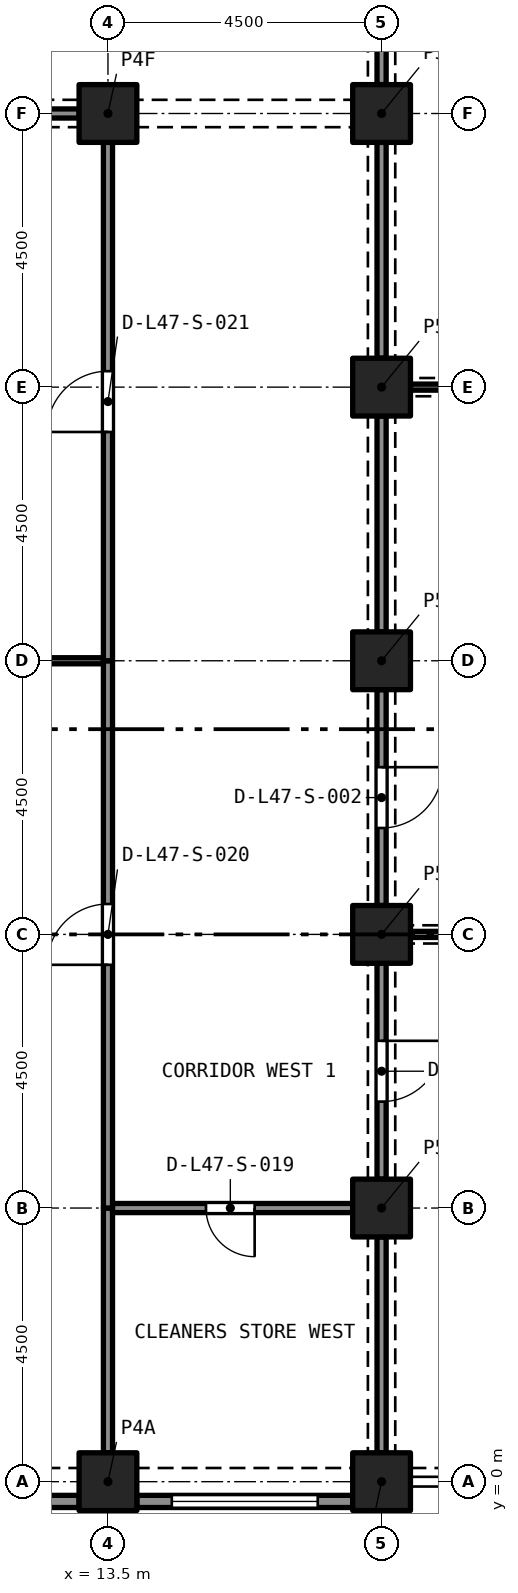
"""IFC4 building model, lengths in metres.
Left out: names, types, materials, properties, quantities, classifications, styles, units other than length and angle.
Written with IfcOpenShell. Run it as: python <this file> out.ifc"""

import sys

from ifc_helpers import new_model, si_unit, direction, frame, frame_2d, origin, origin_2d, place, context, subcontext, project, spatial, rectangle, extrude, element, fill, save


model = new_model("IFC4")
c1 = context("Model", 3, precision=1e-05, world=origin(), true_north=direction((0.0, 1.0)))
c2 = subcontext(c1, "Body", "Model", "MODEL_VIEW")
j1 = project(units=[si_unit("LENGTHUNIT", "METRE"), si_unit("PLANEANGLEUNIT", "RADIAN")], contexts=[c1])
p1 = place(None, origin())
s1 = spatial("IfcSite", under=j1, at=p1, CompositionType="ELEMENT")
p2 = place(p1, origin())
s2 = spatial("IfcBuilding", under=s1, at=p2, CompositionType="ELEMENT")
p3 = place(p2, frame((0.0, 0.0, 172.6)))
s3 = spatial("IfcBuildingStorey", under=s2, at=p3, CompositionType="ELEMENT", Elevation=172.6)
for number, where, z_axis, x_axis in (
    (1, (13.5, 0.0, 0.0), (0.0, 0.0, 1.0), (1.0, 0.0, 0.0)),
    (2, (18.0, 0.0, 0.0), (0.0, 0.0, 1.0), (1.0, 0.0, 0.0)),
    (3, (18.0, 4.5, 0.0), (0.0, 0.0, 1.0), (1.0, 0.0, 0.0)),
    (4, (18.0, 9.0, 0.0), (0.0, 0.0, 1.0), (1.0, 0.0, 0.0)),
    (5, (18.0, 13.5, 0.0), (0.0, 0.0, 1.0), (1.0, 0.0, 0.0)),
    (6, (18.0, 18.0, 0.0), (0.0, 0.0, 1.0), (1.0, 0.0, 0.0)),
    (7, (13.5, 22.5, 0.0), (0.0, 0.0, 1.0), (1.0, 0.0, 0.0)),
    (8, (18.0, 22.5, 0.0), (0.0, 0.0, 1.0), (1.0, 0.0, 0.0)),
):
    element("IfcColumn", number, at=place(p3, frame(where, z_axis=z_axis, x_axis=x_axis)), inside=s3, PredefinedType="COLUMN", context=c2, shape_type="SweptSolid", body=[
        extrude(rectangle(XDim=0.95, YDim=0.95, at=origin_2d()), origin(), (0.0, 0.0, 1.0), 3.7),
    ])
p4 = place(p3, frame((13.025, -0.325, 0.0), z_axis=(0.0, 0.0, 1.0), x_axis=(-1.0, 0.0, 0.0)))
e9 = element("IfcWall", 9, at=p4, inside=s3, PredefinedType="SOLIDWALL", context=c2, shape_type="SweptSolid", body=[
    extrude(rectangle(XDim=3.55, YDim=0.2, at=frame_2d((1.775, 0.0))), origin(), (0.0, 0.0, 1.0), 3.7),
])
p5 = place(p4, frame((0.575, 0.0, 0.45)))
e10 = element("IfcOpeningElement", 10, at=p5, cuts=e9, PredefinedType="OPENING", context=c2, shape_type="SweptSolid", body=[
    extrude(rectangle(XDim=2.4, YDim=1.95, at=frame_2d((1.2, 0.975))), frame((0.0, 0.11, 0.0), z_axis=(0.0, -1.0, 0.0), x_axis=(1.0, 0.0, 0.0)), (0.0, 0.0, 1.0), 0.22),
])
p6 = place(p3, frame((17.525, -0.325, 0.0), z_axis=(0.0, 0.0, 1.0), x_axis=(-1.0, 0.0, 0.0)))
e11 = element("IfcWall", 11, at=p6, inside=s3, PredefinedType="SOLIDWALL", context=c2, shape_type="SweptSolid", body=[
    extrude(rectangle(XDim=3.55, YDim=0.2, at=frame_2d((1.775, 0.0))), origin(), (0.0, 0.0, 1.0), 3.7),
])
p7 = place(p6, frame((0.575, 0.0, 0.45)))
e12 = element("IfcOpeningElement", 12, at=p7, cuts=e11, PredefinedType="OPENING", context=c2, shape_type="SweptSolid", body=[
    extrude(rectangle(XDim=2.4, YDim=1.95, at=frame_2d((1.2, 0.975))), frame((0.0, 0.11, 0.0), z_axis=(0.0, -1.0, 0.0), x_axis=(1.0, 0.0, 0.0)), (0.0, 0.0, 1.0), 0.22),
])
p8 = place(p3, frame((18.475, 9.0, 0.0), z_axis=(0.0, 0.0, 1.0), x_axis=(1.0, 0.0, 0.0)))
e13 = element("IfcWall", 13, at=p8, inside=s3, PredefinedType="PARTITIONING", context=c2, shape_type="SweptSolid", body=[
    extrude(rectangle(XDim=12.55, YDim=0.1, at=frame_2d((6.275, 0.0))), origin(), (0.0, 0.0, 1.0), 3.25),
])
p9 = place(p3, frame((18.0, 0.475, 0.0), z_axis=(0.0, 0.0, 1.0), x_axis=(0.0, 1.0, 0.0)))
e14 = element("IfcWall", 14, at=p9, inside=s3, PredefinedType="PARTITIONING", context=c2, shape_type="SweptSolid", body=[
    extrude(rectangle(XDim=3.55, YDim=0.15, at=frame_2d((1.775, 0.0))), origin(), (0.0, 0.0, 1.0), 2.88),
])
p10 = place(p3, frame((18.0, 8.525, 0.0), z_axis=(0.0, 0.0, 1.0), x_axis=(0.0, -1.0, 0.0)))
e15 = element("IfcWall", 15, at=p10, inside=s3, PredefinedType="PARTITIONING", context=c2, shape_type="SweptSolid", body=[
    extrude(rectangle(XDim=3.55, YDim=0.15, at=frame_2d((1.775, 0.0))), origin(), (0.0, 0.0, 1.0), 2.88),
])
p11 = place(p10, frame((1.275, 0.0, 0.0)))
e16 = element("IfcOpeningElement", 16, at=p11, cuts=e15, PredefinedType="OPENING", context=c2, shape_type="SweptSolid", body=[
    extrude(rectangle(XDim=1.0, YDim=2.1, at=frame_2d((0.5, 1.05))), frame((0.0, 0.085, 0.0), z_axis=(0.0, -1.0, 0.0), x_axis=(1.0, 0.0, 0.0)), (0.0, 0.0, 1.0), 0.17),
])
p12 = place(p3, frame((18.475, 18.0, 0.0), z_axis=(0.0, 0.0, 1.0), x_axis=(1.0, 0.0, 0.0)))
e17 = element("IfcWall", 17, at=p12, inside=s3, PredefinedType="PARTITIONING", context=c2, shape_type="SweptSolid", body=[
    extrude(rectangle(XDim=12.55, YDim=0.1, at=frame_2d((6.275, 0.0))), origin(), (0.0, 0.0, 1.0), 3.25),
])
p13 = place(p3, frame((18.0, 13.025, 0.0), z_axis=(0.0, 0.0, 1.0), x_axis=(0.0, -1.0, 0.0)))
e18 = element("IfcWall", 18, at=p13, inside=s3, PredefinedType="PARTITIONING", context=c2, shape_type="SweptSolid", body=[
    extrude(rectangle(XDim=3.55, YDim=0.15, at=frame_2d((1.775, 0.0))), origin(), (0.0, 0.0, 1.0), 2.88),
])
p14 = place(p13, frame((1.275, 0.0, 0.0)))
e19 = element("IfcOpeningElement", 19, at=p14, cuts=e18, PredefinedType="OPENING", context=c2, shape_type="SweptSolid", body=[
    extrude(rectangle(XDim=1.0, YDim=2.1, at=frame_2d((0.5, 1.05))), frame((0.0, 0.085, 0.0), z_axis=(0.0, -1.0, 0.0), x_axis=(1.0, 0.0, 0.0)), (0.0, 0.0, 1.0), 0.17),
])
p15 = place(p3, frame((18.0, 13.975, 0.0), z_axis=(0.0, 0.0, 1.0), x_axis=(0.0, 1.0, 0.0)))
e20 = element("IfcWall", 20, at=p15, inside=s3, PredefinedType="PARTITIONING", context=c2, shape_type="SweptSolid", body=[
    extrude(rectangle(XDim=3.55, YDim=0.15, at=frame_2d((1.775, 0.0))), origin(), (0.0, 0.0, 1.0), 2.88),
])
p16 = place(p3, frame((18.0, 26.525, 0.0), z_axis=(0.0, 0.0, 1.0), x_axis=(0.0, -1.0, 0.0)))
e21 = element("IfcWall", 21, at=p16, inside=s3, PredefinedType="PARTITIONING", context=c2, shape_type="SweptSolid", body=[
    extrude(rectangle(XDim=3.55, YDim=0.15, at=frame_2d((1.775, 0.0))), origin(), (0.0, 0.0, 1.0), 2.88),
])
p17 = place(p16, frame((1.275, 0.0, 0.0)))
e22 = element("IfcOpeningElement", 22, at=p17, cuts=e21, PredefinedType="OPENING", context=c2, shape_type="SweptSolid", body=[
    extrude(rectangle(XDim=1.0, YDim=2.1, at=frame_2d((0.5, 1.05))), frame((0.0, 0.085, 0.0), z_axis=(0.0, -1.0, 0.0), x_axis=(1.0, 0.0, 0.0)), (0.0, 0.0, 1.0), 0.17),
])
for number, where, z_axis, x_axis in (
    (23, (18.0, 18.475, 0.0), (0.0, 0.0, 1.0), (0.0, 1.0, 0.0)),
    (24, (9.475, 22.5, 0.0), (0.0, 0.0, 1.0), (1.0, 0.0, 0.0)),
):
    element("IfcWall", number, at=place(p3, frame(where, z_axis=z_axis, x_axis=x_axis)), inside=s3, PredefinedType="PARTITIONING", context=c2, shape_type="SweptSolid", body=[
        extrude(rectangle(XDim=3.55, YDim=0.15, at=frame_2d((1.775, 0.0))), origin(), (0.0, 0.0, 1.0), 2.88),
    ])
p18 = place(p3, frame((13.5, 0.475, 0.0), z_axis=(0.0, 0.0, 1.0), x_axis=(0.0, 1.0, 0.0)))
e25 = element("IfcWall", 25, at=p18, inside=s3, PredefinedType="PARTITIONING", context=c2, shape_type="SweptSolid", body=[
    extrude(rectangle(XDim=4.025, YDim=0.15, at=frame_2d((2.012, 0.0))), origin(), (0.0, 0.0, 1.0), 3.4),
])
p19 = place(p3, frame((17.525, 4.5, 0.0), z_axis=(0.0, 0.0, 1.0), x_axis=(-1.0, 0.0, 0.0)))
e26 = element("IfcWall", 26, at=p19, inside=s3, PredefinedType="PARTITIONING", context=c2, shape_type="SweptSolid", body=[
    extrude(rectangle(XDim=3.95, YDim=0.15, at=frame_2d((1.975, 0.0))), origin(), (0.0, 0.0, 1.0), 3.4),
])
p20 = place(p19, frame((1.613, 0.0, 0.0)))
e27 = element("IfcOpeningElement", 27, at=p20, cuts=e26, PredefinedType="OPENING", context=c2, shape_type="SweptSolid", body=[
    extrude(rectangle(XDim=0.8, YDim=2.1, at=frame_2d((0.4, 1.05))), frame((0.0, 0.085, 0.0), z_axis=(0.0, -1.0, 0.0), x_axis=(1.0, 0.0, 0.0)), (0.0, 0.0, 1.0), 0.17),
])
p21 = place(p3, frame((13.5, 4.5, 0.0), z_axis=(0.0, 0.0, 1.0), x_axis=(0.0, 1.0, 0.0)))
e28 = element("IfcWall", 28, at=p21, inside=s3, PredefinedType="PARTITIONING", context=c2, shape_type="SweptSolid", body=[
    extrude(rectangle(XDim=9.0, YDim=0.15, at=frame_2d((4.5, 0.0))), origin(), (0.0, 0.0, 1.0), 3.4),
])
p22 = place(p21, frame((4.0, 0.0, 0.0)))
e29 = element("IfcOpeningElement", 29, at=p22, cuts=e28, PredefinedType="OPENING", context=c2, shape_type="SweptSolid", body=[
    extrude(rectangle(XDim=1.0, YDim=2.1, at=frame_2d((0.5, 1.05))), frame((0.0, 0.085, 0.0), z_axis=(0.0, -1.0, 0.0), x_axis=(1.0, 0.0, 0.0)), (0.0, 0.0, 1.0), 0.17),
])
p23 = place(p3, frame((13.5, 13.5, 0.0), z_axis=(0.0, 0.0, 1.0), x_axis=(0.0, 1.0, 0.0)))
e30 = element("IfcWall", 30, at=p23, inside=s3, PredefinedType="PARTITIONING", context=c2, shape_type="SweptSolid", body=[
    extrude(rectangle(XDim=8.525, YDim=0.15, at=frame_2d((4.262, 0.0))), origin(), (0.0, 0.0, 1.0), 3.4),
])
p24 = place(p23, frame((3.762, 0.0, 0.0)))
e31 = element("IfcOpeningElement", 31, at=p24, cuts=e30, PredefinedType="OPENING", context=c2, shape_type="SweptSolid", body=[
    extrude(rectangle(XDim=1.0, YDim=2.1, at=frame_2d((0.5, 1.05))), frame((0.0, 0.085, 0.0), z_axis=(0.0, -1.0, 0.0), x_axis=(1.0, 0.0, 0.0)), (0.0, 0.0, 1.0), 0.17),
])
p25 = place(p3, frame((0.475, 13.5, 0.0), z_axis=(0.0, 0.0, 1.0), x_axis=(1.0, 0.0, 0.0)))
e32 = element("IfcWall", 32, at=p25, inside=s3, PredefinedType="PARTITIONING", context=c2, shape_type="SweptSolid", body=[
    extrude(rectangle(XDim=12.95, YDim=0.1, at=frame_2d((6.475, 0.0))), origin(), (0.0, 0.0, 1.0), 3.4),
])
p26 = place(p7, origin())
e33 = element("IfcWindow", 33, at=p26, inside=s3, PartitioningType="SINGLE_PANEL", PredefinedType="WINDOW", context=c2, shape_type="SweptSolid", body=[
    extrude(rectangle(XDim=2.4, YDim=1.95, at=frame_2d((1.2, 0.975))), frame((0.0, 0.03, 0.0), z_axis=(0.0, -1.0, 0.0), x_axis=(1.0, 0.0, 0.0)), (0.0, 0.0, 1.0), 0.06),
])
fill(e12, e33)
p27 = place(p11, origin())
e34 = element("IfcDoor", 34, at=p27, inside=s3, OperationType="SINGLE_SWING_RIGHT", PredefinedType="DOOR", context=c2, shape_type="SweptSolid", body=[
    extrude(rectangle(XDim=1.0, YDim=2.1, at=frame_2d((0.5, 1.05))), frame((0.0, 0.025, 0.0), z_axis=(0.0, -1.0, 0.0), x_axis=(1.0, 0.0, 0.0)), (0.0, 0.0, 1.0), 0.05),
])
fill(e16, e34)
p28 = place(p14, origin())
e35 = element("IfcDoor", 35, at=p28, inside=s3, OperationType="SINGLE_SWING_RIGHT", PredefinedType="DOOR", context=c2, shape_type="SweptSolid", body=[
    extrude(rectangle(XDim=1.0, YDim=2.1, at=frame_2d((0.5, 1.05))), frame((0.0, 0.025, 0.0), z_axis=(0.0, -1.0, 0.0), x_axis=(1.0, 0.0, 0.0)), (0.0, 0.0, 1.0), 0.05),
])
fill(e19, e35)
p29 = place(p20, origin())
e36 = element("IfcDoor", 36, at=p29, inside=s3, OperationType="SINGLE_SWING_RIGHT", PredefinedType="DOOR", context=c2, shape_type="SweptSolid", body=[
    extrude(rectangle(XDim=0.8, YDim=2.1, at=frame_2d((0.4, 1.05))), frame((0.0, 0.025, 0.0), z_axis=(0.0, -1.0, 0.0), x_axis=(1.0, 0.0, 0.0)), (0.0, 0.0, 1.0), 0.05),
])
fill(e27, e36)
p30 = place(p22, origin())
e37 = element("IfcDoor", 37, at=p30, inside=s3, OperationType="SINGLE_SWING_RIGHT", PredefinedType="DOOR", context=c2, shape_type="SweptSolid", body=[
    extrude(rectangle(XDim=1.0, YDim=2.1, at=frame_2d((0.5, 1.05))), frame((0.0, 0.025, 0.0), z_axis=(0.0, -1.0, 0.0), x_axis=(1.0, 0.0, 0.0)), (0.0, 0.0, 1.0), 0.05),
])
fill(e29, e37)
p31 = place(p24, origin())
e38 = element("IfcDoor", 38, at=p31, inside=s3, OperationType="SINGLE_SWING_RIGHT", PredefinedType="DOOR", context=c2, shape_type="SweptSolid", body=[
    extrude(rectangle(XDim=1.0, YDim=2.1, at=frame_2d((0.5, 1.05))), frame((0.0, 0.025, 0.0), z_axis=(0.0, -1.0, 0.0), x_axis=(1.0, 0.0, 0.0)), (0.0, 0.0, 1.0), 0.05),
])
fill(e31, e38)
save(model, sys.argv[1])
